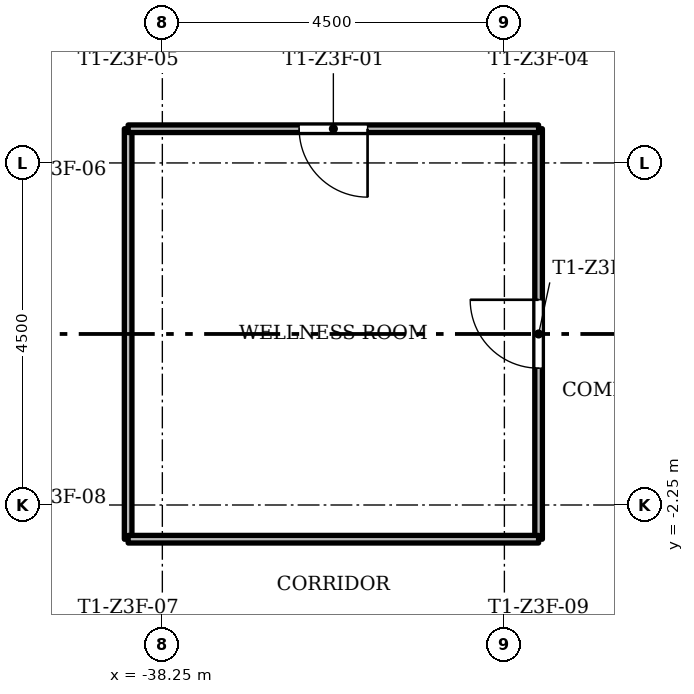
"""IFC4 building model, lengths in metres.
Left out: names, types, materials, properties, quantities, classifications, styles, units other than length and angle.
Written with IfcOpenShell. Run it as: python <this file> out.ifc"""

import sys

from ifc_helpers import new_model, si_unit, direction, frame, frame_2d, origin, place, context, subcontext, project, spatial, rectangle, extrude, element, fill, save


model = new_model("IFC4")
c1 = context("Model", 3, precision=1e-05, world=origin(), true_north=direction((0.0, 1.0)))
c2 = subcontext(c1, "Body", "Model", "MODEL_VIEW")
j1 = project(units=[si_unit("LENGTHUNIT", "METRE"), si_unit("PLANEANGLEUNIT", "RADIAN")], contexts=[c1])
p1 = place(None, origin())
s1 = spatial("IfcSite", under=j1, at=p1, CompositionType="ELEMENT")
p2 = place(p1, origin())
s2 = spatial("IfcBuilding", under=s1, at=p2, CompositionType="ELEMENT")
p3 = place(p2, frame((0.0, 0.0, 171.1)))
s3 = spatial("IfcBuildingStorey", under=s2, at=p3, CompositionType="ELEMENT", Elevation=171.1)
p4 = place(p3, frame((-38.7, -2.7, 0.0), z_axis=(0.0, 0.0, 1.0), x_axis=(0.0, 1.0, 0.0)))
e1 = element("IfcWall", 1, at=p4, inside=s3, PredefinedType="PARTITIONING", context=c2, shape_type="SweptSolid", body=[
    extrude(rectangle(XDim=5.4, YDim=0.1, at=frame_2d((2.7, 0.0))), origin(), (0.0, 0.0, 1.0), 3.0),
])
p5 = place(p3, frame((-33.3, -2.7, 0.0), z_axis=(0.0, 0.0, 1.0), x_axis=(0.0, 1.0, 0.0)))
e2 = element("IfcWall", 2, at=p5, inside=s3, PredefinedType="PARTITIONING", context=c2, shape_type="SweptSolid", body=[
    extrude(rectangle(XDim=5.4, YDim=0.1, at=frame_2d((2.7, 0.0))), origin(), (0.0, 0.0, 1.0), 3.0),
])
p6 = place(p5, frame((2.25, 0.0, 0.0)))
e3 = element("IfcOpeningElement", 3, at=p6, cuts=e2, PredefinedType="OPENING", context=c2, shape_type="SweptSolid", body=[
    extrude(rectangle(XDim=0.9, YDim=2.1, at=frame_2d((0.45, 1.05))), frame((0.0, 0.06, 0.0), z_axis=(0.0, -1.0, 0.0), x_axis=(1.0, 0.0, 0.0)), (0.0, 0.0, 1.0), 0.12),
])
p7 = place(p3, frame((-38.7, -2.7, 0.0), z_axis=(0.0, 0.0, 1.0), x_axis=(1.0, 0.0, 0.0)))
e4 = element("IfcWall", 4, at=p7, inside=s3, PredefinedType="PARTITIONING", context=c2, shape_type="SweptSolid", body=[
    extrude(rectangle(XDim=5.4, YDim=0.1, at=frame_2d((2.7, 0.0))), origin(), (0.0, 0.0, 1.0), 3.0),
])
p8 = place(p3, frame((-38.7, 2.7, 0.0), z_axis=(0.0, 0.0, 1.0), x_axis=(1.0, 0.0, 0.0)))
e5 = element("IfcWall", 5, at=p8, inside=s3, PredefinedType="PARTITIONING", context=c2, shape_type="SweptSolid", body=[
    extrude(rectangle(XDim=5.4, YDim=0.1, at=frame_2d((2.7, 0.0))), origin(), (0.0, 0.0, 1.0), 3.0),
])
p9 = place(p8, frame((2.25, 0.0, 0.0)))
e6 = element("IfcOpeningElement", 6, at=p9, cuts=e5, PredefinedType="OPENING", context=c2, shape_type="SweptSolid", body=[
    extrude(rectangle(XDim=0.9, YDim=2.1, at=frame_2d((0.45, 1.05))), frame((0.0, 0.06, 0.0), z_axis=(0.0, -1.0, 0.0), x_axis=(1.0, 0.0, 0.0)), (0.0, 0.0, 1.0), 0.12),
])
p10 = place(p9, origin())
e7 = element("IfcDoor", 7, at=p10, inside=s3, OperationType="SINGLE_SWING_RIGHT", PredefinedType="DOOR", context=c2, shape_type="SweptSolid", body=[
    extrude(rectangle(XDim=0.9, YDim=2.1, at=frame_2d((0.45, 1.05))), frame((0.0, 0.025, 0.0), z_axis=(0.0, -1.0, 0.0), x_axis=(1.0, 0.0, 0.0)), (0.0, 0.0, 1.0), 0.05),
])
fill(e6, e7)
p11 = place(p6, origin())
e8 = element("IfcDoor", 8, at=p11, inside=s3, OperationType="SINGLE_SWING_LEFT", PredefinedType="DOOR", context=c2, shape_type="SweptSolid", body=[
    extrude(rectangle(XDim=0.9, YDim=2.1, at=frame_2d((0.45, 1.05))), frame((0.0, 0.025, 0.0), z_axis=(0.0, -1.0, 0.0), x_axis=(1.0, 0.0, 0.0)), (0.0, 0.0, 1.0), 0.05),
])
fill(e3, e8)
save(model, sys.argv[1])
